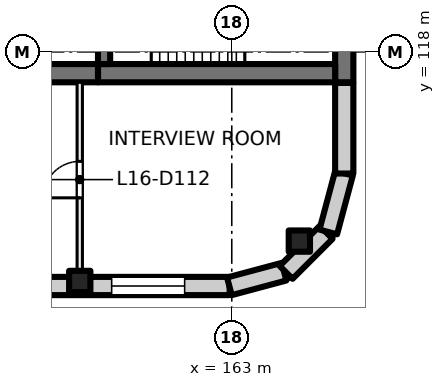
"""IFC4 building model, lengths in metres.
Left out: names, types, materials, properties, quantities, classifications, styles, units other than length and angle.
Written with IfcOpenShell. Run it as: python <this file> out.ifc"""

import sys

from ifc_helpers import new_model, si_unit, direction, frame, frame_2d, origin, origin_2d, place, context, subcontext, project, spatial, rectangle, extrude, element, fill, save


model = new_model("IFC4")
c1 = context("Model", 3, precision=1e-05, world=origin(), true_north=direction((0.0, 1.0)))
c2 = subcontext(c1, "Body", "Model", "MODEL_VIEW")
j1 = project(units=[si_unit("LENGTHUNIT", "METRE"), si_unit("PLANEANGLEUNIT", "RADIAN")], contexts=[c1])
p1 = place(None, origin())
s1 = spatial("IfcSite", under=j1, at=p1, CompositionType="ELEMENT")
p2 = place(p1, origin())
s2 = spatial("IfcBuilding", under=s1, at=p2, CompositionType="ELEMENT")
p3 = place(p2, frame((0.0, 0.0, 71.5)))
s3 = spatial("IfcBuildingStorey", under=s2, at=p3, CompositionType="ELEMENT", Elevation=71.5)
for number, where, z_axis, x_axis in (
    (1, (165.223, 111.777, 0.0), (0.0, 0.0, 1.0), (1.0, 0.0, 0.0)),
    (2, (158.0, 110.45, 0.0), (0.0, 0.0, 1.0), (1.0, 0.0, 0.0)),
):
    element("IfcColumn", number, at=place(p3, frame(where, z_axis=z_axis, x_axis=x_axis)), inside=s3, PredefinedType="COLUMN", context=c2, shape_type="SweptSolid", body=[
        extrude(rectangle(XDim=0.7, YDim=0.7, at=origin_2d()), origin(), (0.0, 0.0, 1.0), 4.0),
    ])
p4 = place(p3, frame((166.7, 120.8, 0.0), z_axis=(0.0, 0.0, 1.0), x_axis=(0.0, -1.0, 0.0)))
e3 = element("IfcWall", 3, at=p4, inside=s3, PredefinedType="SHEAR", context=c2, shape_type="SweptSolid", body=[
    extrude(rectangle(XDim=3.8, YDim=0.6, at=frame_2d((1.9, 0.0))), origin(), (0.0, 0.0, 1.0), 4.0),
])
p5 = place(p3, frame((166.4, 117.3, 0.0), z_axis=(0.0, 0.0, 1.0), x_axis=(-1.0, 0.0, 0.0)))
e4 = element("IfcWall", 4, at=p5, inside=s3, PredefinedType="SHEAR", context=c2, shape_type="SweptSolid", body=[
    extrude(rectangle(XDim=7.8, YDim=0.6, at=frame_2d((3.9, 0.0))), origin(), (0.0, 0.0, 1.0), 4.0),
])
p6 = place(p3, frame((158.6, 117.3, 0.0), z_axis=(0.0, 0.0, 1.0), x_axis=(-1.0, 0.0, 0.0)))
e5 = element("IfcWall", 5, at=p6, inside=s3, PredefinedType="SHEAR", context=c2, shape_type="SweptSolid", body=[
    extrude(rectangle(XDim=4.6, YDim=0.6, at=frame_2d((2.3, 0.0))), origin(), (0.0, 0.0, 1.0), 4.0),
])
p7 = place(p3, frame((158.8, 120.4, 0.0), z_axis=(0.0, 0.0, 1.0), x_axis=(0.0, -1.0, 0.0)))
e6 = element("IfcWall", 6, at=p7, inside=s3, PredefinedType="SHEAR", context=c2, shape_type="SweptSolid", body=[
    extrude(rectangle(XDim=2.8, YDim=0.4, at=frame_2d((1.4, 0.0))), origin(), (0.0, 0.0, 1.0), 4.0),
])
p8 = place(p7, frame((0.9, 0.0, 0.0)))
e7 = element("IfcOpeningElement", 7, at=p8, cuts=e6, PredefinedType="OPENING", context=c2, shape_type="SweptSolid", body=[
    extrude(rectangle(XDim=1.0, YDim=2.1, at=frame_2d((0.5, 1.05))), frame((0.0, 0.21, 0.0), z_axis=(0.0, -1.0, 0.0), x_axis=(1.0, 0.0, 0.0)), (0.0, 0.0, 1.0), 0.42),
])
p9 = place(p3, frame((162.93, 110.3, 0.0), z_axis=(0.0, 0.0, 1.0), x_axis=(-1.0, 0.0, 0.0)))
e8 = element("IfcWall", 8, at=p9, inside=s3, PredefinedType="SOLIDWALL", context=c2, shape_type="SweptSolid", body=[
    extrude(rectangle(XDim=31.93, YDim=0.6, at=frame_2d((15.965, 0.0))), origin(), (0.0, 0.0, 1.0), 3.625),
])
p10 = place(p9, frame((1.48, 0.0, 0.9)))
e9 = element("IfcOpeningElement", 9, at=p10, cuts=e8, PredefinedType="OPENING", context=c2, shape_type="SweptSolid", body=[
    extrude(rectangle(XDim=2.4, YDim=2.4, at=frame_2d((1.2, 1.2))), frame((0.0, 0.31, 0.0), z_axis=(0.0, -1.0, 0.0), x_axis=(1.0, 0.0, 0.0)), (0.0, 0.0, 1.0), 0.62),
])
p11 = place(p9, frame((5.98, 0.0, 0.9)))
e10 = element("IfcOpeningElement", 10, at=p11, cuts=e8, PredefinedType="OPENING", context=c2, shape_type="SweptSolid", body=[
    extrude(rectangle(XDim=2.4, YDim=2.4, at=frame_2d((1.2, 1.2))), frame((0.0, 0.31, 0.0), z_axis=(0.0, -1.0, 0.0), x_axis=(1.0, 0.0, 0.0)), (0.0, 0.0, 1.0), 0.62),
])
p12 = place(p9, frame((10.48, 0.0, 0.9)))
e11 = element("IfcOpeningElement", 11, at=p12, cuts=e8, PredefinedType="OPENING", context=c2, shape_type="SweptSolid", body=[
    extrude(rectangle(XDim=2.4, YDim=2.4, at=frame_2d((1.2, 1.2))), frame((0.0, 0.31, 0.0), z_axis=(0.0, -1.0, 0.0), x_axis=(1.0, 0.0, 0.0)), (0.0, 0.0, 1.0), 0.62),
])
p13 = place(p9, frame((14.98, 0.0, 0.9)))
e12 = element("IfcOpeningElement", 12, at=p13, cuts=e8, PredefinedType="OPENING", context=c2, shape_type="SweptSolid", body=[
    extrude(rectangle(XDim=2.4, YDim=2.4, at=frame_2d((1.2, 1.2))), frame((0.0, 0.31, 0.0), z_axis=(0.0, -1.0, 0.0), x_axis=(1.0, 0.0, 0.0)), (0.0, 0.0, 1.0), 0.62),
])
p14 = place(p9, frame((19.48, 0.0, 0.9)))
e13 = element("IfcOpeningElement", 13, at=p14, cuts=e8, PredefinedType="OPENING", context=c2, shape_type="SweptSolid", body=[
    extrude(rectangle(XDim=2.4, YDim=2.4, at=frame_2d((1.2, 1.2))), frame((0.0, 0.31, 0.0), z_axis=(0.0, -1.0, 0.0), x_axis=(1.0, 0.0, 0.0)), (0.0, 0.0, 1.0), 0.62),
])
p15 = place(p9, frame((23.98, 0.0, 0.9)))
e14 = element("IfcOpeningElement", 14, at=p15, cuts=e8, PredefinedType="OPENING", context=c2, shape_type="SweptSolid", body=[
    extrude(rectangle(XDim=2.4, YDim=2.4, at=frame_2d((1.2, 1.2))), frame((0.0, 0.31, 0.0), z_axis=(0.0, -1.0, 0.0), x_axis=(1.0, 0.0, 0.0)), (0.0, 0.0, 1.0), 0.62),
])
p16 = place(p9, frame((28.48, 0.0, 0.9)))
e15 = element("IfcOpeningElement", 15, at=p16, cuts=e8, PredefinedType="OPENING", context=c2, shape_type="SweptSolid", body=[
    extrude(rectangle(XDim=2.4, YDim=2.4, at=frame_2d((1.2, 1.2))), frame((0.0, 0.31, 0.0), z_axis=(0.0, -1.0, 0.0), x_axis=(1.0, 0.0, 0.0)), (0.0, 0.0, 1.0), 0.62),
])
for number, where, z_axis, x_axis in (
    (16, (164.719, 110.771, 0.0), (0.0, 0.0, 1.0), (-0.966, -0.259, 0.0)),
    (17, (166.104, 112.064, 0.0), (0.0, 0.0, 1.0), (-0.707, -0.707, 0.0)),
):
    element("IfcWall", number, at=place(p3, frame(where, z_axis=z_axis, x_axis=x_axis)), inside=s3, PredefinedType="SOLIDWALL", context=c2, shape_type="SweptSolid", body=[
        extrude(rectangle(XDim=1.861, YDim=0.6, at=frame_2d((0.93, 0.0))), origin(), (0.0, 0.0, 1.0), 3.625),
    ])
p17 = place(p3, frame((166.692, 114.01, 0.0), z_axis=(0.0, 0.0, 1.0), x_axis=(-0.258839784042, -0.965920269068, 0.0)))
e18 = element("IfcWall", 18, at=p17, inside=s3, PredefinedType="SOLIDWALL", context=c2, shape_type="SweptSolid", body=[
    extrude(rectangle(XDim=2.0, YDim=0.6, at=frame_2d((1.0, 0.0))), origin(), (0.0, 0.0, 1.0), 3.625),
])
p18 = place(p3, frame((166.7, 116.98, 0.0), z_axis=(0.0, 0.0, 1.0), x_axis=(0.0, -1.0, 0.0)))
e19 = element("IfcWall", 19, at=p18, inside=s3, PredefinedType="SOLIDWALL", context=c2, shape_type="SweptSolid", body=[
    extrude(rectangle(XDim=2.98, YDim=0.6, at=frame_2d((1.49, 0.0))), origin(), (0.0, 0.0, 1.0), 3.625),
])
p19 = place(p3, frame((158.0, 110.6, 0.0), z_axis=(0.0, 0.0, 1.0), x_axis=(0.0, 1.0, 0.0)))
e20 = element("IfcWall", 20, at=p19, inside=s3, PredefinedType="PARTITIONING", context=c2, shape_type="SweptSolid", body=[
    extrude(rectangle(XDim=6.4, YDim=0.175, at=frame_2d((3.2, 0.0))), origin(), (0.0, 0.0, 1.0), 3.625),
])
p20 = place(p19, frame((2.6, 0.0, 0.0)))
e21 = element("IfcOpeningElement", 21, at=p20, cuts=e20, PredefinedType="OPENING", context=c2, shape_type="SweptSolid", body=[
    extrude(rectangle(XDim=1.2, YDim=2.1, at=frame_2d((0.6, 1.05))), frame((0.0, 0.097, 0.0), z_axis=(0.0, -1.0, 0.0), x_axis=(1.0, 0.0, 0.0)), (0.0, 0.0, 1.0), 0.195),
])
p21 = place(p10, origin())
e22 = element("IfcWindow", 22, at=p21, inside=s3, PartitioningType="SINGLE_PANEL", PredefinedType="WINDOW", context=c2, shape_type="SweptSolid", body=[
    extrude(rectangle(XDim=2.4, YDim=2.4, at=frame_2d((1.2, 1.2))), frame((0.0, 0.03, 0.0), z_axis=(0.0, -1.0, 0.0), x_axis=(1.0, 0.0, 0.0)), (0.0, 0.0, 1.0), 0.06),
])
fill(e9, e22)
p22 = place(p20, origin())
e23 = element("IfcDoor", 23, at=p22, inside=s3, OperationType="DOUBLE_DOOR_SINGLE_SWING", PredefinedType="DOOR", context=c2, shape_type="SweptSolid", body=[
    extrude(rectangle(XDim=1.2, YDim=2.1, at=frame_2d((0.6, 1.05))), frame((0.0, 0.025, 0.0), z_axis=(0.0, -1.0, 0.0), x_axis=(1.0, 0.0, 0.0)), (0.0, 0.0, 1.0), 0.05),
])
fill(e21, e23)
save(model, sys.argv[1])
